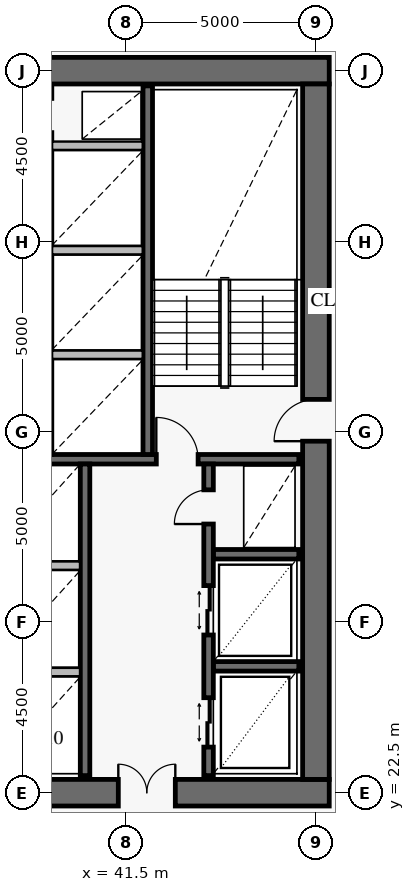
"""IFC4 building model, lengths in metres.
Left out: names, types, materials, properties, quantities, classifications, styles, units other than length and angle.
Written with IfcOpenShell. Run it as: python <this file> out.ifc"""

import sys

from ifc_helpers import new_model, si_unit, direction, frame, frame_2d, origin, place, context, subcontext, project, spatial, rectangle, extrude, element, fill, save


model = new_model("IFC4")
c1 = context("Model", 3, precision=1e-05, world=origin(), true_north=direction((0.0, 1.0)))
c2 = subcontext(c1, "Body", "Model", "MODEL_VIEW")
j1 = project(units=[si_unit("LENGTHUNIT", "METRE"), si_unit("PLANEANGLEUNIT", "RADIAN")], contexts=[c1])
p1 = place(None, origin())
s1 = spatial("IfcSite", under=j1, at=p1, CompositionType="ELEMENT")
p2 = place(p1, origin())
s2 = spatial("IfcBuilding", under=s1, at=p2, CompositionType="ELEMENT")
p3 = place(p2, frame((0.0, 0.0, 115.2)))
s3 = spatial("IfcBuildingStorey", under=s2, at=p3, CompositionType="ELEMENT", Elevation=115.2)
p4 = place(p3, frame((37.35, 22.5, 0.0), z_axis=(0.0, 0.0, 1.0), x_axis=(1.0, 0.0, 0.0)))
e1 = element("IfcWall", 1, at=p4, inside=s3, PredefinedType="SHEAR", context=c2, shape_type="SweptSolid", body=[
    extrude(rectangle(XDim=9.5, YDim=0.7, at=frame_2d((4.75, 0.0))), origin(), (0.0, 0.0, 1.0), 3.8),
])
p5 = place(p4, frame((3.95, 0.0, 0.0)))
e2 = element("IfcOpeningElement", 2, at=p5, cuts=e1, PredefinedType="OPENING", context=c2, shape_type="SweptSolid", body=[
    extrude(rectangle(XDim=1.5, YDim=2.15, at=frame_2d((0.75, 1.075))), frame((0.0, 0.362, 0.0), z_axis=(0.0, -1.0, 0.0), x_axis=(1.0, 0.0, 0.0)), (0.0, 0.0, 1.0), 0.724),
])
p6 = place(p3, frame((46.85, 41.5, 0.0), z_axis=(0.0, 0.0, 1.0), x_axis=(-1.0, 0.0, 0.0)))
e3 = element("IfcWall", 3, at=p6, inside=s3, PredefinedType="SHEAR", context=c2, shape_type="SweptSolid", body=[
    extrude(rectangle(XDim=7.9, YDim=0.7, at=frame_2d((3.95, 0.0))), origin(), (0.0, 0.0, 1.0), 3.8),
])
p7 = place(p3, frame((46.5, 22.85, 0.0), z_axis=(0.0, 0.0, 1.0), x_axis=(0.0, 1.0, 0.0)))
e4 = element("IfcWall", 4, at=p7, inside=s3, PredefinedType="SHEAR", context=c2, shape_type="SweptSolid", body=[
    extrude(rectangle(XDim=18.3, YDim=0.7, at=frame_2d((9.15, 0.0))), origin(), (0.0, 0.0, 1.0), 3.8),
])
p8 = place(p7, frame((8.9, 0.0, 0.0)))
e5 = element("IfcOpeningElement", 5, at=p8, cuts=e4, PredefinedType="OPENING", context=c2, shape_type="SweptSolid", body=[
    extrude(rectangle(XDim=1.1, YDim=2.15, at=frame_2d((0.55, 1.075))), frame((0.0, 0.362, 0.0), z_axis=(0.0, -1.0, 0.0), x_axis=(1.0, 0.0, 0.0)), (0.0, 0.0, 1.0), 0.724),
])
p9 = place(p3, frame((25.95, 31.275, 0.0), z_axis=(0.0, 0.0, 1.0), x_axis=(1.0, 0.0, 0.0)))
e6 = element("IfcWall", 6, at=p9, inside=s3, PredefinedType="SOLIDWALL", context=c2, shape_type="SweptSolid", body=[
    extrude(rectangle(XDim=20.1, YDim=0.25, at=frame_2d((10.05, 0.0))), origin(), (0.0, 0.0, 1.0), 3.8),
])
p10 = place(p9, frame((2.6, 0.0, 0.0)))
e7 = element("IfcOpeningElement", 7, at=p10, cuts=e6, PredefinedType="OPENING", context=c2, shape_type="SweptSolid", body=[
    extrude(rectangle(XDim=1.1, YDim=2.15, at=frame_2d((0.55, 1.075))), frame((0.0, 0.137, 0.0), z_axis=(0.0, -1.0, 0.0), x_axis=(1.0, 0.0, 0.0)), (0.0, 0.0, 1.0), 0.274),
])
p11 = place(p9, frame((10.6, 0.0, 0.0)))
e8 = element("IfcOpeningElement", 8, at=p11, cuts=e6, PredefinedType="OPENING", context=c2, shape_type="SweptSolid", body=[
    extrude(rectangle(XDim=1.1, YDim=2.15, at=frame_2d((0.55, 1.075))), frame((0.0, 0.137, 0.0), z_axis=(0.0, -1.0, 0.0), x_axis=(1.0, 0.0, 0.0)), (0.0, 0.0, 1.0), 0.274),
])
p12 = place(p9, frame((16.35, 0.0, 0.0)))
e9 = element("IfcOpeningElement", 9, at=p12, cuts=e6, PredefinedType="OPENING", context=c2, shape_type="SweptSolid", body=[
    extrude(rectangle(XDim=1.1, YDim=2.15, at=frame_2d((0.55, 1.075))), frame((0.0, 0.137, 0.0), z_axis=(0.0, -1.0, 0.0), x_axis=(1.0, 0.0, 0.0)), (0.0, 0.0, 1.0), 0.274),
])
p13 = place(p3, frame((42.075, 31.4, 0.0), z_axis=(0.0, 0.0, 1.0), x_axis=(0.0, 1.0, 0.0)))
e10 = element("IfcWall", 10, at=p13, inside=s3, PredefinedType="SOLIDWALL", context=c2, shape_type="SweptSolid", body=[
    extrude(rectangle(XDim=9.7, YDim=0.25, at=frame_2d((4.85, 0.0))), origin(), (0.0, 0.0, 1.0), 3.8),
])
p14 = place(p3, frame((40.425, 22.95, 0.0), z_axis=(0.0, 0.0, 1.0), x_axis=(0.0, 1.0, 0.0)))
e11 = element("IfcWall", 11, at=p14, inside=s3, PredefinedType="SOLIDWALL", context=c2, shape_type="SweptSolid", body=[
    extrude(rectangle(XDim=8.2, YDim=0.25, at=frame_2d((4.1, 0.0))), origin(), (0.0, 0.0, 1.0), 3.8),
])
for number, where, z_axis, x_axis in (
    (12, (43.8, 25.825, 0.0), (0.0, 0.0, 1.0), (1.0, 0.0, 0.0)),
    (13, (43.8, 28.775, 0.0), (0.0, 0.0, 1.0), (1.0, 0.0, 0.0)),
):
    element("IfcWall", number, at=place(p3, frame(where, z_axis=z_axis, x_axis=x_axis)), inside=s3, PredefinedType="SOLIDWALL", context=c2, shape_type="SweptSolid", body=[
        extrude(rectangle(XDim=2.25, YDim=0.25, at=frame_2d((1.125, 0.0))), origin(), (0.0, 0.0, 1.0), 3.8),
    ])
p15 = place(p3, frame((43.675, 22.95, 0.0), z_axis=(0.0, 0.0, 1.0), x_axis=(0.0, 1.0, 0.0)))
e14 = element("IfcWall", 14, at=p15, inside=s3, PredefinedType="SOLIDWALL", context=c2, shape_type="SweptSolid", body=[
    extrude(rectangle(XDim=8.2, YDim=0.25, at=frame_2d((4.1, 0.0))), origin(), (0.0, 0.0, 1.0), 3.8),
])
p16 = place(p15, frame((0.75, 0.0, 0.0)))
e15 = element("IfcOpeningElement", 15, at=p16, cuts=e14, PredefinedType="OPENING", context=c2, shape_type="SweptSolid", body=[
    extrude(rectangle(XDim=1.3, YDim=2.3, at=frame_2d((0.65, 1.15))), frame((0.0, 0.137, 0.0), z_axis=(0.0, -1.0, 0.0), x_axis=(1.0, 0.0, 0.0)), (0.0, 0.0, 1.0), 0.274),
])
p17 = place(p15, frame((3.7, 0.0, 0.0)))
e16 = element("IfcOpeningElement", 16, at=p17, cuts=e14, PredefinedType="OPENING", context=c2, shape_type="SweptSolid", body=[
    extrude(rectangle(XDim=1.3, YDim=2.3, at=frame_2d((0.65, 1.15))), frame((0.0, 0.137, 0.0), z_axis=(0.0, -1.0, 0.0), x_axis=(1.0, 0.0, 0.0)), (0.0, 0.0, 1.0), 0.274),
])
p18 = place(p15, frame((6.62, 0.0, 0.0)))
e17 = element("IfcOpeningElement", 17, at=p18, cuts=e14, PredefinedType="OPENING", context=c2, shape_type="SweptSolid", body=[
    extrude(rectangle(XDim=0.9, YDim=2.1, at=frame_2d((0.45, 1.05))), frame((0.0, 0.137, 0.0), z_axis=(0.0, -1.0, 0.0), x_axis=(1.0, 0.0, 0.0)), (0.0, 0.0, 1.0), 0.274),
])
for number, where, z_axis, x_axis in (
    (18, (39.558, 34.025, 0.0), (0.0, 0.0, 1.0), (1.0, 0.0, 0.0)),
    (19, (39.558, 36.775, 0.0), (0.0, 0.0, 1.0), (1.0, 0.0, 0.0)),
    (20, (39.558, 39.525, 0.0), (0.0, 0.0, 1.0), (1.0, 0.0, 0.0)),
):
    element("IfcWall", number, at=place(p3, frame(where, z_axis=z_axis, x_axis=x_axis)), inside=s3, PredefinedType="PARTITIONING", context=c2, shape_type="SweptSolid", body=[
        extrude(rectangle(XDim=2.384, YDim=0.22, at=frame_2d((1.192, 0.0))), origin(), (0.0, 0.0, 1.0), 3.55),
    ])
for number, where, z_axis, x_axis in (
    (21, (38.008, 25.675, 0.0), (0.0, 0.0, 1.0), (1.0, 0.0, 0.0)),
    (22, (38.008, 28.475, 0.0), (0.0, 0.0, 1.0), (1.0, 0.0, 0.0)),
):
    element("IfcWall", number, at=place(p3, frame(where, z_axis=z_axis, x_axis=x_axis)), inside=s3, PredefinedType="PARTITIONING", context=c2, shape_type="SweptSolid", body=[
        extrude(rectangle(XDim=2.284, YDim=0.22, at=frame_2d((1.142, 0.0))), origin(), (0.0, 0.0, 1.0), 3.55),
    ])
p19 = place(p8, origin())
e23 = element("IfcDoor", 23, at=p19, inside=s3, OperationType="SINGLE_SWING_LEFT", PredefinedType="USERDEFINED", context=c2, shape_type="SweptSolid", body=[
    extrude(rectangle(XDim=1.1, YDim=2.15, at=frame_2d((0.55, 1.075))), frame((0.0, 0.025, 0.0), z_axis=(0.0, -1.0, 0.0), x_axis=(1.0, 0.0, 0.0)), (0.0, 0.0, 1.0), 0.05),
])
fill(e5, e23)
p20 = place(p5, origin())
e24 = element("IfcDoor", 24, at=p20, inside=s3, OperationType="DOUBLE_DOOR_SINGLE_SWING", PredefinedType="DOOR", context=c2, shape_type="SweptSolid", body=[
    extrude(rectangle(XDim=1.5, YDim=2.15, at=frame_2d((0.75, 1.075))), frame((0.0, 0.025, 0.0), z_axis=(0.0, -1.0, 0.0), x_axis=(1.0, 0.0, 0.0)), (0.0, 0.0, 1.0), 0.05),
])
fill(e2, e24)
p21 = place(p12, origin())
e25 = element("IfcDoor", 25, at=p21, inside=s3, OperationType="SINGLE_SWING_LEFT", PredefinedType="USERDEFINED", context=c2, shape_type="SweptSolid", body=[
    extrude(rectangle(XDim=1.1, YDim=2.15, at=frame_2d((0.55, 1.075))), frame((0.0, 0.025, 0.0), z_axis=(0.0, -1.0, 0.0), x_axis=(1.0, 0.0, 0.0)), (0.0, 0.0, 1.0), 0.05),
])
fill(e9, e25)
p22 = place(p16, origin())
e26 = element("IfcDoor", 26, at=p22, inside=s3, OperationType="DOUBLE_DOOR_SLIDING", PredefinedType="DOOR", context=c2, shape_type="SweptSolid", body=[
    extrude(rectangle(XDim=1.3, YDim=2.3, at=frame_2d((0.65, 1.15))), frame((0.0, 0.025, 0.0), z_axis=(0.0, -1.0, 0.0), x_axis=(1.0, 0.0, 0.0)), (0.0, 0.0, 1.0), 0.05),
])
fill(e15, e26)
p23 = place(p17, origin())
e27 = element("IfcDoor", 27, at=p23, inside=s3, OperationType="DOUBLE_DOOR_SLIDING", PredefinedType="DOOR", context=c2, shape_type="SweptSolid", body=[
    extrude(rectangle(XDim=1.3, YDim=2.3, at=frame_2d((0.65, 1.15))), frame((0.0, 0.025, 0.0), z_axis=(0.0, -1.0, 0.0), x_axis=(1.0, 0.0, 0.0)), (0.0, 0.0, 1.0), 0.05),
])
fill(e16, e27)
p24 = place(p18, origin())
e28 = element("IfcDoor", 28, at=p24, inside=s3, OperationType="SINGLE_SWING_LEFT", PredefinedType="DOOR", context=c2, shape_type="SweptSolid", body=[
    extrude(rectangle(XDim=0.9, YDim=2.1, at=frame_2d((0.45, 1.05))), frame((0.0, 0.025, 0.0), z_axis=(0.0, -1.0, 0.0), x_axis=(1.0, 0.0, 0.0)), (0.0, 0.0, 1.0), 0.05),
])
fill(e17, e28)
save(model, sys.argv[1])
